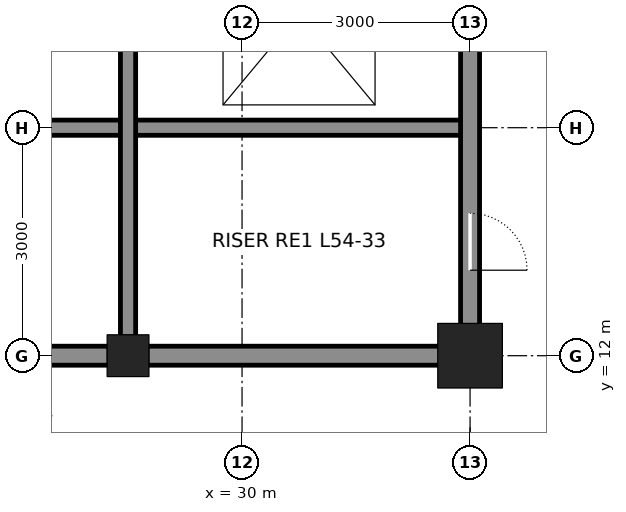
"""IFC4 building model, lengths in metres.
Left out: names, types, materials, properties, quantities, classifications, styles, units other than length and angle.
Written with IfcOpenShell. Run it as: python <this file> out.ifc"""

import sys

from ifc_helpers import new_model, si_unit, direction, frame, frame_2d, origin, origin_2d, place, context, subcontext, project, spatial, rectangle, hollow_rectangle, extrude, element, fill, save


model = new_model("IFC4")
c1 = context("Model", 3, precision=1e-05, world=origin(), true_north=direction((0.0, 1.0)))
c2 = subcontext(c1, "Body", "Model", "MODEL_VIEW")
j1 = project(units=[si_unit("LENGTHUNIT", "METRE"), si_unit("PLANEANGLEUNIT", "RADIAN")], contexts=[c1])
p1 = place(None, origin())
s1 = spatial("IfcSite", under=j1, at=p1, CompositionType="ELEMENT")
p2 = place(p1, origin())
s2 = spatial("IfcBuilding", under=s1, at=p2, CompositionType="ELEMENT")
p3 = place(p2, frame((0.0, 0.0, 243.3)))
s3 = spatial("IfcBuildingStorey", under=s2, at=p3, CompositionType="ELEMENT", Elevation=243.3)
p4 = place(p3, frame((28.5, 12.0, 0.0), z_axis=(0.0, 0.0, 1.0), x_axis=(1.0, 0.0, 0.0)))
e1 = element("IfcColumn", 1, at=p4, inside=s3, PredefinedType="COLUMN", context=c2, shape_type="SweptSolid", body=[
    extrude(hollow_rectangle(XDim=0.55, YDim=0.55, WallThickness=0.045, at=origin_2d()), origin(), (0.0, 0.0, 1.0), 4.2),
])
p5 = place(p3, frame((33.0, 12.0, 0.0), z_axis=(0.0, 0.0, 1.0), x_axis=(1.0, 0.0, 0.0)))
e2 = element("IfcColumn", 2, at=p5, inside=s3, PredefinedType="COLUMN", context=c2, shape_type="SweptSolid", body=[
    extrude(hollow_rectangle(XDim=0.85, YDim=0.85, WallThickness=0.085, at=origin_2d()), origin(), (0.0, 0.0, 1.0), 4.2),
])
p6 = place(p3, frame((25.75, 12.0, 0.0), z_axis=(0.0, 0.0, 1.0), x_axis=(1.0, 0.0, 0.0)))
e3 = element("IfcWall", 3, at=p6, inside=s3, PredefinedType="SOLIDWALL", context=c2, shape_type="SweptSolid", body=[
    extrude(rectangle(XDim=2.5, YDim=0.25, at=frame_2d((1.25, 0.0))), origin(), (0.0, 0.0, 1.0), 3.181),
])
p7 = place(p3, frame((28.75, 12.0, 0.0), z_axis=(0.0, 0.0, 1.0), x_axis=(1.0, 0.0, 0.0)))
e4 = element("IfcWall", 4, at=p7, inside=s3, PredefinedType="SOLIDWALL", context=c2, shape_type="SweptSolid", body=[
    extrude(rectangle(XDim=4.0, YDim=0.25, at=frame_2d((2.0, 0.0))), origin(), (0.0, 0.0, 1.0), 3.181),
])
p8 = place(p3, frame((25.5, 15.0, 0.0), z_axis=(0.0, 0.0, 1.0), x_axis=(1.0, 0.0, 0.0)))
e5 = element("IfcWall", 5, at=p8, inside=s3, PredefinedType="SOLIDWALL", context=c2, shape_type="SweptSolid", body=[
    extrude(rectangle(XDim=7.5, YDim=0.2, at=frame_2d((3.75, 0.0))), origin(), (0.0, 0.0, 1.0), 4.04),
])
p9 = place(p3, frame((28.5, 12.25, 0.0), z_axis=(0.0, 0.0, 1.0), x_axis=(0.0, 1.0, 0.0)))
e6 = element("IfcWall", 6, at=p9, inside=s3, PredefinedType="SOLIDWALL", context=c2, shape_type="SweptSolid", body=[
    extrude(rectangle(XDim=8.5, YDim=0.2, at=frame_2d((4.25, 0.0))), origin(), (0.0, 0.0, 1.0), 3.113),
])
p10 = place(p3, frame((33.0, 12.25, 0.0), z_axis=(0.0, 0.0, 1.0), x_axis=(0.0, 1.0, 0.0)))
e7 = element("IfcWall", 7, at=p10, inside=s3, PredefinedType="SOLIDWALL", context=c2, shape_type="SweptSolid", body=[
    extrude(rectangle(XDim=8.5, YDim=0.25, at=frame_2d((4.25, 0.0))), origin(), (0.0, 0.0, 1.0), 3.113),
])
p11 = place(p10, frame((6.65, 0.0, 0.0)))
e8 = element("IfcOpeningElement", 8, at=p11, cuts=e7, PredefinedType="OPENING", context=c2, shape_type="SweptSolid", body=[
    extrude(rectangle(XDim=1.2, YDim=2.1, at=frame_2d((0.6, 1.05))), frame((0.0, 0.135, 0.0), z_axis=(0.0, -1.0, 0.0), x_axis=(1.0, 0.0, 0.0)), (0.0, 0.0, 1.0), 0.27),
])
p12 = place(p10, frame((0.875, 0.0, 0.0)))
e9 = element("IfcOpeningElement", 9, at=p12, cuts=e7, PredefinedType="OPENING", context=c2, shape_type="SweptSolid", body=[
    extrude(rectangle(XDim=0.75, YDim=2.1, at=frame_2d((0.375, 1.05))), frame((0.0, 0.135, 0.0), z_axis=(0.0, -1.0, 0.0), x_axis=(1.0, 0.0, 0.0)), (0.0, 0.0, 1.0), 0.27),
])
p13 = place(p12, frame((0.75, 0.0, 0.0), z_axis=(0.0, 0.0, 1.0), x_axis=(-1.0, 0.0, 0.0)))
e10 = element("IfcDoor", 10, at=p13, inside=s3, OperationType="SINGLE_SWING_RIGHT", PredefinedType="DOOR", context=c2, shape_type="SweptSolid", body=[
    extrude(rectangle(XDim=0.75, YDim=2.1, at=frame_2d((0.375, 1.05))), frame((0.0, 0.025, 0.0), z_axis=(0.0, -1.0, 0.0), x_axis=(1.0, 0.0, 0.0)), (0.0, 0.0, 1.0), 0.05),
])
fill(e9, e10)
save(model, sys.argv[1])
